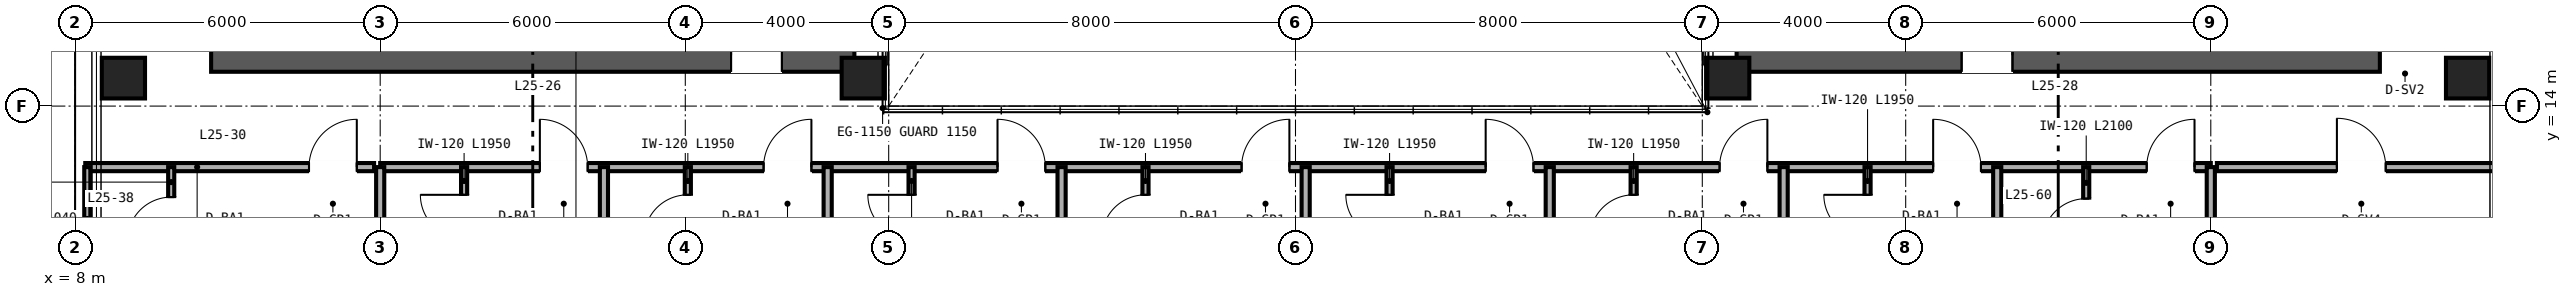
"""IFC4 building model, lengths in metres.
Left out: names, types, materials, properties, quantities, classifications, styles, units other than length and angle.
Written with IfcOpenShell. Run it as: python <this file> out.ifc"""

import sys

from ifc_helpers import new_model, si_unit, direction, frame, frame_2d, origin, origin_2d, place, context, subcontext, project, spatial, rectangle, hollow_rectangle, extrude, source, transform, mapped, element, fill, save


model = new_model("IFC4")
c1 = context("Model", 3, precision=1e-05, world=origin(), true_north=direction((0.0, 1.0)))
c2 = subcontext(c1, "Body", "Model", "MODEL_VIEW")
j1 = project(units=[si_unit("LENGTHUNIT", "METRE"), si_unit("PLANEANGLEUNIT", "RADIAN")], contexts=[c1])
p1 = place(None, origin())
s1 = spatial("IfcSite", under=j1, at=p1, CompositionType="ELEMENT")
p2 = place(p1, origin())
s2 = spatial("IfcBuilding", under=s1, at=p2, CompositionType="ELEMENT")
p3 = place(p2, frame((0.0, 0.0, 104.4)))
s3 = spatial("IfcBuildingStorey", under=s2, at=p3, CompositionType="ELEMENT", Elevation=104.4)
p4 = place(p3, frame((10.675, 15.0, 0.0), z_axis=(0.0, 0.0, 1.0), x_axis=(1.0, 0.0, 0.0)))
e1 = element("IfcWall", 1, at=p4, inside=s3, PredefinedType="SHEAR", context=c2, shape_type="SweptSolid", body=[
    extrude(rectangle(XDim=12.65, YDim=0.65, at=frame_2d((6.325, 0.0))), origin(), (0.0, 0.0, 1.0), 3.36),
])
p5 = place(p4, frame((10.225, 0.0, 0.0)))
e2 = element("IfcOpeningElement", 2, at=p5, cuts=e1, PredefinedType="OPENING", context=c2, shape_type="SweptSolid", body=[
    extrude(rectangle(XDim=1.0, YDim=2.15, at=frame_2d((0.5, 1.075))), frame((0.0, 0.335, 0.0), z_axis=(0.0, -1.0, 0.0), x_axis=(1.0, 0.0, 0.0)), (0.0, 0.0, 1.0), 0.67),
])
p6 = place(p3, frame((40.675, 15.0, 0.0), z_axis=(0.0, 0.0, 1.0), x_axis=(1.0, 0.0, 0.0)))
e3 = element("IfcWall", 3, at=p6, inside=s3, PredefinedType="SHEAR", context=c2, shape_type="SweptSolid", body=[
    extrude(rectangle(XDim=12.65, YDim=0.65, at=frame_2d((6.325, 0.0))), origin(), (0.0, 0.0, 1.0), 3.36),
])
p7 = place(p6, frame((4.425, 0.0, 0.0)))
e4 = element("IfcOpeningElement", 4, at=p7, cuts=e3, PredefinedType="OPENING", context=c2, shape_type="SweptSolid", body=[
    extrude(rectangle(XDim=1.0, YDim=2.15, at=frame_2d((0.5, 1.075))), frame((0.0, 0.335, 0.0), z_axis=(0.0, -1.0, 0.0), x_axis=(1.0, 0.0, 0.0)), (0.0, 0.0, 1.0), 0.67),
])
m1 = source(origin(), c2, "Body", "SweptSolid", [
    extrude(hollow_rectangle(XDim=0.85, YDim=0.8, WallThickness=0.032, at=origin_2d()), origin(), (0.0, 0.0, 1.0), 3.36),
])
for number, where, z_axis, x_axis in (
    (5, (8.95, 14.55, 0.0), (0.0, 0.0, 1.0), (1.0, 0.0, 0.0)),
    (6, (23.5, 14.55, 0.0), (0.0, 0.0, 1.0), (1.0, 0.0, 0.0)),
    (7, (40.5, 14.55, 0.0), (0.0, 0.0, 1.0), (1.0, 0.0, 0.0)),
    (8, (55.05, 14.55, 0.0), (0.0, 0.0, 1.0), (1.0, 0.0, 0.0)),
):
    element("IfcColumn", number, at=place(p3, frame(where, z_axis=z_axis, x_axis=x_axis)), inside=s3, PredefinedType="COLUMN", context=c2, shape_type="MappedRepresentation", body=[
        mapped(m1, transform((0.0, 0.0, 0.0), scale=1.0)),
    ])
p8 = place(p3, frame((8.2, 12.8, 0.0), z_axis=(0.0, 0.0, 1.0), x_axis=(1.0, 0.0, 0.0)))
e9 = element("IfcWall", 9, at=p8, inside=s3, PredefinedType="PARTITIONING", context=c2, shape_type="SweptSolid", body=[
    extrude(rectangle(XDim=5.68, YDim=0.16, at=frame_2d((2.84, 0.0))), origin(), (0.0, 0.0, 1.0), 3.36),
])
p9 = place(p8, frame((4.4, 0.0, 0.0)))
e10 = element("IfcOpeningElement", 10, at=p9, cuts=e9, PredefinedType="OPENING", context=c2, shape_type="SweptSolid", body=[
    extrude(rectangle(XDim=0.94, YDim=2.15, at=frame_2d((0.47, 1.075))), frame((0.0, 0.09, 0.0), z_axis=(0.0, -1.0, 0.0), x_axis=(1.0, 0.0, 0.0)), (0.0, 0.0, 1.0), 0.18),
])
p10 = place(p3, frame((9.89, 10.76, 0.0), z_axis=(0.0, 0.0, 1.0), x_axis=(0.0, 1.0, 0.0)))
e11 = element("IfcWall", 11, at=p10, inside=s3, PredefinedType="PARTITIONING", context=c2, shape_type="SweptSolid", body=[
    extrude(rectangle(XDim=2.04, YDim=0.12, at=frame_2d((1.02, 0.0))), origin(), (0.0, 0.0, 1.0), 3.36),
])
p11 = place(p10, frame((0.59, 0.0, 0.0)))
e12 = element("IfcOpeningElement", 12, at=p11, cuts=e11, PredefinedType="OPENING", context=c2, shape_type="SweptSolid", body=[
    extrude(rectangle(XDim=0.86, YDim=2.1, at=frame_2d((0.43, 1.05))), frame((0.0, 0.07, 0.0), z_axis=(0.0, -1.0, 0.0), x_axis=(1.0, 0.0, 0.0)), (0.0, 0.0, 1.0), 0.14),
])
p12 = place(p3, frame((8.24, 10.76, 0.0), z_axis=(0.0, 0.0, 1.0), x_axis=(0.0, 1.0, 0.0)))
e13 = element("IfcWall", 13, at=p12, inside=s3, PredefinedType="PARTITIONING", context=c2, shape_type="SweptSolid", body=[
    extrude(rectangle(XDim=2.04, YDim=0.12, at=frame_2d((1.02, 0.0))), origin(), (0.0, 0.0, 1.0), 3.36),
])
p13 = place(p3, frame((50.12, 12.8, 0.0), z_axis=(0.0, 0.0, 1.0), x_axis=(1.0, 0.0, 0.0)))
e14 = element("IfcWall", 14, at=p13, inside=s3, PredefinedType="PARTITIONING", context=c2, shape_type="SweptSolid", body=[
    extrude(rectangle(XDim=5.68, YDim=0.16, at=frame_2d((2.84, 0.0))), origin(), (0.0, 0.0, 1.0), 3.36),
])
p14 = place(p13, frame((2.36, 0.0, 0.0)))
e15 = element("IfcOpeningElement", 15, at=p14, cuts=e14, PredefinedType="OPENING", context=c2, shape_type="SweptSolid", body=[
    extrude(rectangle(XDim=0.96, YDim=2.15, at=frame_2d((0.48, 1.075))), frame((0.0, 0.09, 0.0), z_axis=(0.0, -1.0, 0.0), x_axis=(1.0, 0.0, 0.0)), (0.0, 0.0, 1.0), 0.18),
])
p15 = place(p3, frame((14.0, 12.8, 0.0), z_axis=(0.0, 0.0, 1.0), x_axis=(1.0, 0.0, 0.0)))
e16 = element("IfcWall", 16, at=p15, inside=s3, PredefinedType="PARTITIONING", context=c2, shape_type="SweptSolid", body=[
    extrude(rectangle(XDim=36.0, YDim=0.16, at=frame_2d((18.0, 0.0))), origin(), (0.0, 0.0, 1.0), 2.581),
])
p16 = place(p15, frame((3.14, 0.0, 0.0)))
e17 = element("IfcOpeningElement", 17, at=p16, cuts=e16, PredefinedType="OPENING", context=c2, shape_type="SweptSolid", body=[
    extrude(rectangle(XDim=0.94, YDim=2.15, at=frame_2d((0.47, 1.075))), frame((0.0, 0.09, 0.0), z_axis=(0.0, -1.0, 0.0), x_axis=(1.0, 0.0, 0.0)), (0.0, 0.0, 1.0), 0.18),
])
p17 = place(p15, frame((7.54, 0.0, 0.0)))
e18 = element("IfcOpeningElement", 18, at=p17, cuts=e16, PredefinedType="OPENING", context=c2, shape_type="SweptSolid", body=[
    extrude(rectangle(XDim=0.94, YDim=2.15, at=frame_2d((0.47, 1.075))), frame((0.0, 0.09, 0.0), z_axis=(0.0, -1.0, 0.0), x_axis=(1.0, 0.0, 0.0)), (0.0, 0.0, 1.0), 0.18),
])
p18 = place(p15, frame((12.14, 0.0, 0.0)))
e19 = element("IfcOpeningElement", 19, at=p18, cuts=e16, PredefinedType="OPENING", context=c2, shape_type="SweptSolid", body=[
    extrude(rectangle(XDim=0.94, YDim=2.15, at=frame_2d((0.47, 1.075))), frame((0.0, 0.09, 0.0), z_axis=(0.0, -1.0, 0.0), x_axis=(1.0, 0.0, 0.0)), (0.0, 0.0, 1.0), 0.18),
])
p19 = place(p15, frame((16.94, 0.0, 0.0)))
e20 = element("IfcOpeningElement", 20, at=p19, cuts=e16, PredefinedType="OPENING", context=c2, shape_type="SweptSolid", body=[
    extrude(rectangle(XDim=0.94, YDim=2.15, at=frame_2d((0.47, 1.075))), frame((0.0, 0.09, 0.0), z_axis=(0.0, -1.0, 0.0), x_axis=(1.0, 0.0, 0.0)), (0.0, 0.0, 1.0), 0.18),
])
p20 = place(p15, frame((21.74, 0.0, 0.0)))
e21 = element("IfcOpeningElement", 21, at=p20, cuts=e16, PredefinedType="OPENING", context=c2, shape_type="SweptSolid", body=[
    extrude(rectangle(XDim=0.94, YDim=2.15, at=frame_2d((0.47, 1.075))), frame((0.0, 0.09, 0.0), z_axis=(0.0, -1.0, 0.0), x_axis=(1.0, 0.0, 0.0)), (0.0, 0.0, 1.0), 0.18),
])
p21 = place(p15, frame((26.34, 0.0, 0.0)))
e22 = element("IfcOpeningElement", 22, at=p21, cuts=e16, PredefinedType="OPENING", context=c2, shape_type="SweptSolid", body=[
    extrude(rectangle(XDim=0.94, YDim=2.15, at=frame_2d((0.47, 1.075))), frame((0.0, 0.09, 0.0), z_axis=(0.0, -1.0, 0.0), x_axis=(1.0, 0.0, 0.0)), (0.0, 0.0, 1.0), 0.18),
])
p22 = place(p15, frame((30.54, 0.0, 0.0)))
e23 = element("IfcOpeningElement", 23, at=p22, cuts=e16, PredefinedType="OPENING", context=c2, shape_type="SweptSolid", body=[
    extrude(rectangle(XDim=0.94, YDim=2.15, at=frame_2d((0.47, 1.075))), frame((0.0, 0.09, 0.0), z_axis=(0.0, -1.0, 0.0), x_axis=(1.0, 0.0, 0.0)), (0.0, 0.0, 1.0), 0.18),
])
p23 = place(p15, frame((34.74, 0.0, 0.0)))
e24 = element("IfcOpeningElement", 24, at=p23, cuts=e16, PredefinedType="OPENING", context=c2, shape_type="SweptSolid", body=[
    extrude(rectangle(XDim=0.94, YDim=2.15, at=frame_2d((0.47, 1.075))), frame((0.0, 0.09, 0.0), z_axis=(0.0, -1.0, 0.0), x_axis=(1.0, 0.0, 0.0)), (0.0, 0.0, 1.0), 0.18),
])
for number, where, z_axis, x_axis in (
    (25, (14.0, 2.36, 0.0), (0.0, 0.0, 1.0), (0.0, 1.0, 0.0)),
    (26, (50.0, 2.36, 0.0), (0.0, 0.0, 1.0), (0.0, 1.0, 0.0)),
    (27, (18.4, 2.36, 0.0), (0.0, 0.0, 1.0), (0.0, 1.0, 0.0)),
):
    element("IfcWall", number, at=place(p3, frame(where, z_axis=z_axis, x_axis=x_axis)), inside=s3, PredefinedType="PARTITIONING", context=c2, shape_type="SweptSolid", body=[
        extrude(rectangle(XDim=10.44, YDim=0.16, at=frame_2d((5.22, 0.0))), origin(), (0.0, 0.0, 1.0), 2.667),
    ])
p24 = place(p3, frame((15.65, 10.85, 0.0), z_axis=(0.0, 0.0, 1.0), x_axis=(0.0, 1.0, 0.0)))
e28 = element("IfcWall", 28, at=p24, inside=s3, PredefinedType="PARTITIONING", context=c2, shape_type="SweptSolid", body=[
    extrude(rectangle(XDim=1.95, YDim=0.12, at=frame_2d((0.975, 0.0))), origin(), (0.0, 0.0, 1.0), 3.36),
])
p25 = place(p24, frame((0.545, 0.0, 0.0)))
e29 = element("IfcOpeningElement", 29, at=p25, cuts=e28, PredefinedType="OPENING", context=c2, shape_type="SweptSolid", body=[
    extrude(rectangle(XDim=0.86, YDim=2.1, at=frame_2d((0.43, 1.05))), frame((0.0, 0.07, 0.0), z_axis=(0.0, -1.0, 0.0), x_axis=(1.0, 0.0, 0.0)), (0.0, 0.0, 1.0), 0.14),
])
p26 = place(p3, frame((22.8, 2.36, 0.0), z_axis=(0.0, 0.0, 1.0), x_axis=(0.0, 1.0, 0.0)))
e30 = element("IfcWall", 30, at=p26, inside=s3, PredefinedType="PARTITIONING", context=c2, shape_type="SweptSolid", body=[
    extrude(rectangle(XDim=10.44, YDim=0.16, at=frame_2d((5.22, 0.0))), origin(), (0.0, 0.0, 1.0), 2.823),
])
p27 = place(p3, frame((20.05, 10.85, 0.0), z_axis=(0.0, 0.0, 1.0), x_axis=(0.0, 1.0, 0.0)))
e31 = element("IfcWall", 31, at=p27, inside=s3, PredefinedType="PARTITIONING", context=c2, shape_type="SweptSolid", body=[
    extrude(rectangle(XDim=1.95, YDim=0.12, at=frame_2d((0.975, 0.0))), origin(), (0.0, 0.0, 1.0), 3.36),
])
p28 = place(p27, frame((0.545, 0.0, 0.0)))
e32 = element("IfcOpeningElement", 32, at=p28, cuts=e31, PredefinedType="OPENING", context=c2, shape_type="SweptSolid", body=[
    extrude(rectangle(XDim=0.86, YDim=2.1, at=frame_2d((0.43, 1.05))), frame((0.0, 0.07, 0.0), z_axis=(0.0, -1.0, 0.0), x_axis=(1.0, 0.0, 0.0)), (0.0, 0.0, 1.0), 0.14),
])
p29 = place(p3, frame((27.4, 2.36, 0.0), z_axis=(0.0, 0.0, 1.0), x_axis=(0.0, 1.0, 0.0)))
e33 = element("IfcWall", 33, at=p29, inside=s3, PredefinedType="PARTITIONING", context=c2, shape_type="SweptSolid", body=[
    extrude(rectangle(XDim=10.44, YDim=0.16, at=frame_2d((5.22, 0.0))), origin(), (0.0, 0.0, 1.0), 2.433),
])
p30 = place(p3, frame((24.45, 10.85, 0.0), z_axis=(0.0, 0.0, 1.0), x_axis=(0.0, 1.0, 0.0)))
e34 = element("IfcWall", 34, at=p30, inside=s3, PredefinedType="PARTITIONING", context=c2, shape_type="SweptSolid", body=[
    extrude(rectangle(XDim=1.95, YDim=0.12, at=frame_2d((0.975, 0.0))), origin(), (0.0, 0.0, 1.0), 3.36),
])
p31 = place(p30, frame((0.545, 0.0, 0.0)))
e35 = element("IfcOpeningElement", 35, at=p31, cuts=e34, PredefinedType="OPENING", context=c2, shape_type="SweptSolid", body=[
    extrude(rectangle(XDim=0.86, YDim=2.1, at=frame_2d((0.43, 1.05))), frame((0.0, 0.07, 0.0), z_axis=(0.0, -1.0, 0.0), x_axis=(1.0, 0.0, 0.0)), (0.0, 0.0, 1.0), 0.14),
])
p32 = place(p3, frame((32.2, 2.36, 0.0), z_axis=(0.0, 0.0, 1.0), x_axis=(0.0, 1.0, 0.0)))
e36 = element("IfcWall", 36, at=p32, inside=s3, PredefinedType="PARTITIONING", context=c2, shape_type="SweptSolid", body=[
    extrude(rectangle(XDim=10.44, YDim=0.16, at=frame_2d((5.22, 0.0))), origin(), (0.0, 0.0, 1.0), 2.433),
])
p33 = place(p3, frame((29.05, 10.85, 0.0), z_axis=(0.0, 0.0, 1.0), x_axis=(0.0, 1.0, 0.0)))
e37 = element("IfcWall", 37, at=p33, inside=s3, PredefinedType="PARTITIONING", context=c2, shape_type="SweptSolid", body=[
    extrude(rectangle(XDim=1.95, YDim=0.12, at=frame_2d((0.975, 0.0))), origin(), (0.0, 0.0, 1.0), 3.36),
])
p34 = place(p33, frame((0.545, 0.0, 0.0)))
e38 = element("IfcOpeningElement", 38, at=p34, cuts=e37, PredefinedType="OPENING", context=c2, shape_type="SweptSolid", body=[
    extrude(rectangle(XDim=0.86, YDim=2.1, at=frame_2d((0.43, 1.05))), frame((0.0, 0.07, 0.0), z_axis=(0.0, -1.0, 0.0), x_axis=(1.0, 0.0, 0.0)), (0.0, 0.0, 1.0), 0.14),
])
p35 = place(p3, frame((37.0, 2.36, 0.0), z_axis=(0.0, 0.0, 1.0), x_axis=(0.0, 1.0, 0.0)))
e39 = element("IfcWall", 39, at=p35, inside=s3, PredefinedType="PARTITIONING", context=c2, shape_type="SweptSolid", body=[
    extrude(rectangle(XDim=10.44, YDim=0.16, at=frame_2d((5.22, 0.0))), origin(), (0.0, 0.0, 1.0), 2.433),
])
p36 = place(p3, frame((33.85, 10.85, 0.0), z_axis=(0.0, 0.0, 1.0), x_axis=(0.0, 1.0, 0.0)))
e40 = element("IfcWall", 40, at=p36, inside=s3, PredefinedType="PARTITIONING", context=c2, shape_type="SweptSolid", body=[
    extrude(rectangle(XDim=1.95, YDim=0.12, at=frame_2d((0.975, 0.0))), origin(), (0.0, 0.0, 1.0), 3.36),
])
p37 = place(p36, frame((0.545, 0.0, 0.0)))
e41 = element("IfcOpeningElement", 41, at=p37, cuts=e40, PredefinedType="OPENING", context=c2, shape_type="SweptSolid", body=[
    extrude(rectangle(XDim=0.86, YDim=2.1, at=frame_2d((0.43, 1.05))), frame((0.0, 0.07, 0.0), z_axis=(0.0, -1.0, 0.0), x_axis=(1.0, 0.0, 0.0)), (0.0, 0.0, 1.0), 0.14),
])
p38 = place(p3, frame((41.6, 2.36, 0.0), z_axis=(0.0, 0.0, 1.0), x_axis=(0.0, 1.0, 0.0)))
e42 = element("IfcWall", 42, at=p38, inside=s3, PredefinedType="PARTITIONING", context=c2, shape_type="SweptSolid", body=[
    extrude(rectangle(XDim=10.44, YDim=0.16, at=frame_2d((5.22, 0.0))), origin(), (0.0, 0.0, 1.0), 2.823),
])
p39 = place(p3, frame((38.65, 10.85, 0.0), z_axis=(0.0, 0.0, 1.0), x_axis=(0.0, 1.0, 0.0)))
e43 = element("IfcWall", 43, at=p39, inside=s3, PredefinedType="PARTITIONING", context=c2, shape_type="SweptSolid", body=[
    extrude(rectangle(XDim=1.95, YDim=0.12, at=frame_2d((0.975, 0.0))), origin(), (0.0, 0.0, 1.0), 3.36),
])
p40 = place(p39, frame((0.545, 0.0, 0.0)))
e44 = element("IfcOpeningElement", 44, at=p40, cuts=e43, PredefinedType="OPENING", context=c2, shape_type="SweptSolid", body=[
    extrude(rectangle(XDim=0.86, YDim=2.1, at=frame_2d((0.43, 1.05))), frame((0.0, 0.07, 0.0), z_axis=(0.0, -1.0, 0.0), x_axis=(1.0, 0.0, 0.0)), (0.0, 0.0, 1.0), 0.14),
])
p41 = place(p3, frame((45.8, 2.36, 0.0), z_axis=(0.0, 0.0, 1.0), x_axis=(0.0, 1.0, 0.0)))
e45 = element("IfcWall", 45, at=p41, inside=s3, PredefinedType="PARTITIONING", context=c2, shape_type="SweptSolid", body=[
    extrude(rectangle(XDim=10.44, YDim=0.16, at=frame_2d((5.22, 0.0))), origin(), (0.0, 0.0, 1.0), 2.667),
])
p42 = place(p3, frame((43.25, 10.85, 0.0), z_axis=(0.0, 0.0, 1.0), x_axis=(0.0, 1.0, 0.0)))
e46 = element("IfcWall", 46, at=p42, inside=s3, PredefinedType="PARTITIONING", context=c2, shape_type="SweptSolid", body=[
    extrude(rectangle(XDim=1.95, YDim=0.12, at=frame_2d((0.975, 0.0))), origin(), (0.0, 0.0, 1.0), 3.36),
])
p43 = place(p42, frame((0.545, 0.0, 0.0)))
e47 = element("IfcOpeningElement", 47, at=p43, cuts=e46, PredefinedType="OPENING", context=c2, shape_type="SweptSolid", body=[
    extrude(rectangle(XDim=0.86, YDim=2.1, at=frame_2d((0.43, 1.05))), frame((0.0, 0.07, 0.0), z_axis=(0.0, -1.0, 0.0), x_axis=(1.0, 0.0, 0.0)), (0.0, 0.0, 1.0), 0.14),
])
p44 = place(p3, frame((47.55, 10.7, 0.0), z_axis=(0.0, 0.0, 1.0), x_axis=(0.0, 1.0, 0.0)))
e48 = element("IfcWall", 48, at=p44, inside=s3, PredefinedType="PARTITIONING", context=c2, shape_type="SweptSolid", body=[
    extrude(rectangle(XDim=2.1, YDim=0.12, at=frame_2d((1.05, 0.0))), origin(), (0.0, 0.0, 1.0), 3.36),
])
p45 = place(p44, frame((0.62, 0.0, 0.0)))
e49 = element("IfcOpeningElement", 49, at=p45, cuts=e48, PredefinedType="OPENING", context=c2, shape_type="SweptSolid", body=[
    extrude(rectangle(XDim=0.86, YDim=2.1, at=frame_2d((0.43, 1.05))), frame((0.0, 0.07, 0.0), z_axis=(0.0, -1.0, 0.0), x_axis=(1.0, 0.0, 0.0)), (0.0, 0.0, 1.0), 0.14),
])
m2 = source(origin(), c2, "Body", "SweptSolid", [
    extrude(rectangle(XDim=1.0, YDim=2.15, at=frame_2d((0.5, 1.075))), frame((0.0, 0.025, 0.0), z_axis=(0.0, -1.0, 0.0), x_axis=(1.0, 0.0, 0.0)), (0.0, 0.0, 1.0), 0.05),
])
p46 = place(p5, origin())
e50 = element("IfcDoor", 50, at=p46, inside=s3, OperationType="SINGLE_SWING_LEFT", PredefinedType="DOOR", context=c2, shape_type="MappedRepresentation", body=[
    mapped(m2, transform((0.0, 0.0, 0.0), scale=1.0)),
])
fill(e2, e50)
p47 = place(p7, origin())
e51 = element("IfcDoor", 51, at=p47, inside=s3, OperationType="SINGLE_SWING_RIGHT", PredefinedType="DOOR", context=c2, shape_type="MappedRepresentation", body=[
    mapped(m2, transform((0.0, 0.0, 0.0), scale=1.0)),
])
fill(e4, e51)
m3 = source(origin(), c2, "Body", "SweptSolid", [
    extrude(rectangle(XDim=0.86, YDim=2.1, at=frame_2d((0.43, 1.05))), frame((0.0, 0.025, 0.0), z_axis=(0.0, -1.0, 0.0), x_axis=(1.0, 0.0, 0.0)), (0.0, 0.0, 1.0), 0.05),
])
p48 = place(p11, origin())
e52 = element("IfcDoor", 52, at=p48, inside=s3, OperationType="SINGLE_SWING_LEFT", PredefinedType="DOOR", context=c2, shape_type="MappedRepresentation", body=[
    mapped(m3, transform((0.0, 0.0, 0.0), scale=1.0)),
])
fill(e12, e52)
m4 = source(origin(), c2, "Body", "SweptSolid", [
    extrude(rectangle(XDim=0.94, YDim=2.15, at=frame_2d((0.47, 1.075))), frame((0.0, 0.025, 0.0), z_axis=(0.0, -1.0, 0.0), x_axis=(1.0, 0.0, 0.0)), (0.0, 0.0, 1.0), 0.05),
])
p49 = place(p9, origin())
e53 = element("IfcDoor", 53, at=p49, inside=s3, OperationType="SINGLE_SWING_RIGHT", PredefinedType="DOOR", context=c2, shape_type="MappedRepresentation", body=[
    mapped(m4, transform((0.0, 0.0, 0.0), scale=1.0)),
])
fill(e10, e53)
m5 = source(origin(), c2, "Body", "SweptSolid", [
    extrude(rectangle(XDim=0.96, YDim=2.15, at=frame_2d((0.48, 1.075))), frame((0.0, 0.025, 0.0), z_axis=(0.0, -1.0, 0.0), x_axis=(1.0, 0.0, 0.0)), (0.0, 0.0, 1.0), 0.05),
])
p50 = place(p14, origin())
e54 = element("IfcDoor", 54, at=p50, inside=s3, OperationType="SINGLE_SWING_LEFT", PredefinedType="DOOR", context=c2, shape_type="MappedRepresentation", body=[
    mapped(m5, transform((0.0, 0.0, 0.0), scale=1.0)),
])
fill(e15, e54)
p51 = place(p25, origin())
e55 = element("IfcDoor", 55, at=p51, inside=s3, OperationType="SINGLE_SWING_RIGHT", PredefinedType="DOOR", context=c2, shape_type="MappedRepresentation", body=[
    mapped(m3, transform((0.0, 0.0, 0.0), scale=1.0)),
])
fill(e29, e55)
p52 = place(p28, origin())
e56 = element("IfcDoor", 56, at=p52, inside=s3, OperationType="SINGLE_SWING_LEFT", PredefinedType="DOOR", context=c2, shape_type="MappedRepresentation", body=[
    mapped(m3, transform((0.0, 0.0, 0.0), scale=1.0)),
])
fill(e32, e56)
p53 = place(p31, origin())
e57 = element("IfcDoor", 57, at=p53, inside=s3, OperationType="SINGLE_SWING_RIGHT", PredefinedType="DOOR", context=c2, shape_type="MappedRepresentation", body=[
    mapped(m3, transform((0.0, 0.0, 0.0), scale=1.0)),
])
fill(e35, e57)
p54 = place(p34, origin())
e58 = element("IfcDoor", 58, at=p54, inside=s3, OperationType="SINGLE_SWING_LEFT", PredefinedType="DOOR", context=c2, shape_type="MappedRepresentation", body=[
    mapped(m3, transform((0.0, 0.0, 0.0), scale=1.0)),
])
fill(e38, e58)
p55 = place(p37, origin())
e59 = element("IfcDoor", 59, at=p55, inside=s3, OperationType="SINGLE_SWING_RIGHT", PredefinedType="DOOR", context=c2, shape_type="MappedRepresentation", body=[
    mapped(m3, transform((0.0, 0.0, 0.0), scale=1.0)),
])
fill(e41, e59)
p56 = place(p40, origin())
e60 = element("IfcDoor", 60, at=p56, inside=s3, OperationType="SINGLE_SWING_LEFT", PredefinedType="DOOR", context=c2, shape_type="MappedRepresentation", body=[
    mapped(m3, transform((0.0, 0.0, 0.0), scale=1.0)),
])
fill(e44, e60)
p57 = place(p43, origin())
e61 = element("IfcDoor", 61, at=p57, inside=s3, OperationType="SINGLE_SWING_RIGHT", PredefinedType="DOOR", context=c2, shape_type="MappedRepresentation", body=[
    mapped(m3, transform((0.0, 0.0, 0.0), scale=1.0)),
])
fill(e47, e61)
p58 = place(p45, origin())
e62 = element("IfcDoor", 62, at=p58, inside=s3, OperationType="SINGLE_SWING_LEFT", PredefinedType="DOOR", context=c2, shape_type="MappedRepresentation", body=[
    mapped(m3, transform((0.0, 0.0, 0.0), scale=1.0)),
])
fill(e49, e62)
p59 = place(p16, origin())
e63 = element("IfcDoor", 63, at=p59, inside=s3, OperationType="SINGLE_SWING_LEFT", PredefinedType="DOOR", context=c2, shape_type="MappedRepresentation", body=[
    mapped(m4, transform((0.0, 0.0, 0.0), scale=1.0)),
])
fill(e17, e63)
p60 = place(p17, origin())
e64 = element("IfcDoor", 64, at=p60, inside=s3, OperationType="SINGLE_SWING_RIGHT", PredefinedType="DOOR", context=c2, shape_type="MappedRepresentation", body=[
    mapped(m4, transform((0.0, 0.0, 0.0), scale=1.0)),
])
fill(e18, e64)
p61 = place(p18, origin())
e65 = element("IfcDoor", 65, at=p61, inside=s3, OperationType="SINGLE_SWING_LEFT", PredefinedType="DOOR", context=c2, shape_type="MappedRepresentation", body=[
    mapped(m4, transform((0.0, 0.0, 0.0), scale=1.0)),
])
fill(e19, e65)
p62 = place(p19, origin())
e66 = element("IfcDoor", 66, at=p62, inside=s3, OperationType="SINGLE_SWING_RIGHT", PredefinedType="DOOR", context=c2, shape_type="MappedRepresentation", body=[
    mapped(m4, transform((0.0, 0.0, 0.0), scale=1.0)),
])
fill(e20, e66)
p63 = place(p20, origin())
e67 = element("IfcDoor", 67, at=p63, inside=s3, OperationType="SINGLE_SWING_LEFT", PredefinedType="DOOR", context=c2, shape_type="MappedRepresentation", body=[
    mapped(m4, transform((0.0, 0.0, 0.0), scale=1.0)),
])
fill(e21, e67)
p64 = place(p21, origin())
e68 = element("IfcDoor", 68, at=p64, inside=s3, OperationType="SINGLE_SWING_RIGHT", PredefinedType="DOOR", context=c2, shape_type="MappedRepresentation", body=[
    mapped(m4, transform((0.0, 0.0, 0.0), scale=1.0)),
])
fill(e22, e68)
p65 = place(p22, origin())
e69 = element("IfcDoor", 69, at=p65, inside=s3, OperationType="SINGLE_SWING_LEFT", PredefinedType="DOOR", context=c2, shape_type="MappedRepresentation", body=[
    mapped(m4, transform((0.0, 0.0, 0.0), scale=1.0)),
])
fill(e23, e69)
p66 = place(p23, origin())
e70 = element("IfcDoor", 70, at=p66, inside=s3, OperationType="SINGLE_SWING_RIGHT", PredefinedType="DOOR", context=c2, shape_type="MappedRepresentation", body=[
    mapped(m4, transform((0.0, 0.0, 0.0), scale=1.0)),
])
fill(e24, e70)
save(model, sys.argv[1])
